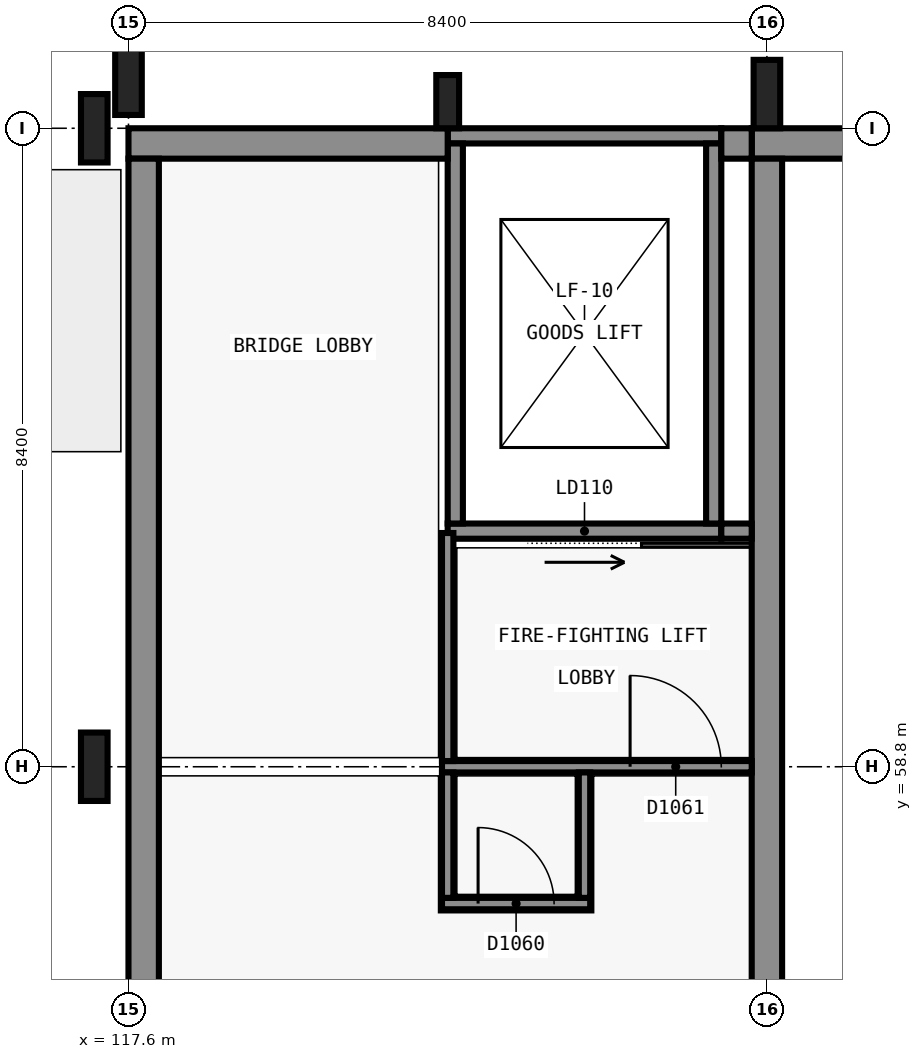
"""IFC4 building model, lengths in metres.
Left out: names, types, materials, properties, quantities, classifications, styles, units other than length and angle.
Written with IfcOpenShell. Run it as: python <this file> out.ifc"""

import sys

from ifc_helpers import new_model, si_unit, direction, frame, frame_2d, origin, origin_2d, place, context, subcontext, project, spatial, rectangle, extrude, element, fill, save


model = new_model("IFC4")
c1 = context("Model", 3, precision=1e-05, world=origin(), true_north=direction((0.0, 1.0)))
c2 = subcontext(c1, "Body", "Model", "MODEL_VIEW")
j1 = project(units=[si_unit("LENGTHUNIT", "METRE"), si_unit("PLANEANGLEUNIT", "RADIAN")], contexts=[c1])
p1 = place(None, origin())
s1 = spatial("IfcSite", under=j1, at=p1, CompositionType="ELEMENT")
p2 = place(p1, origin())
s2 = spatial("IfcBuilding", under=s1, at=p2, CompositionType="ELEMENT")
p3 = place(p2, frame((0.0, 0.0, 5.4)))
s3 = spatial("IfcBuildingStorey", under=s2, at=p3, CompositionType="ELEMENT", Elevation=5.4)
p4 = place(p3, frame((125.4, 61.9, 0.0), z_axis=(0.0, 0.0, 1.0), x_axis=(-1.0, 0.0, 0.0)))
e1 = element("IfcWall", 1, at=p4, inside=s3, PredefinedType="SHEAR", context=c2, shape_type="SweptSolid", body=[
    extrude(rectangle(XDim=3.6, YDim=0.2, at=frame_2d((1.8, 0.0))), origin(), (0.0, 0.0, 1.0), 4.8),
])
p5 = place(p4, frame((1.05, 0.0, 0.0)))
e2 = element("IfcOpeningElement", 2, at=p5, cuts=e1, PredefinedType="OPENING", context=c2, shape_type="SweptSolid", body=[
    extrude(rectangle(XDim=1.5, YDim=2.3, at=frame_2d((0.75, 1.15))), frame((0.0, 0.11, 0.0), z_axis=(0.0, -1.0, 0.0), x_axis=(1.0, 0.0, 0.0)), (0.0, 0.0, 1.0), 0.22),
])
p6 = place(p3, frame((121.8, 67.1, 0.0), z_axis=(0.0, 0.0, 1.0), x_axis=(1.0, 0.0, 0.0)))
e3 = element("IfcWall", 3, at=p6, inside=s3, PredefinedType="SHEAR", context=c2, shape_type="SweptSolid", body=[
    extrude(rectangle(XDim=3.6, YDim=0.2, at=frame_2d((1.8, 0.0))), origin(), (0.0, 0.0, 1.0), 4.8),
])
for number, where, z_axis, x_axis in (
    (4, (121.9, 62.0, 0.0), (0.0, 0.0, 1.0), (0.0, 1.0, 0.0)),
    (5, (125.3, 67.0, 0.0), (0.0, 0.0, 1.0), (0.0, -1.0, 0.0)),
):
    element("IfcWall", number, at=place(p3, frame(where, z_axis=z_axis, x_axis=x_axis)), inside=s3, PredefinedType="SHEAR", context=c2, shape_type="SweptSolid", body=[
        extrude(rectangle(XDim=5.0, YDim=0.2, at=frame_2d((2.5, 0.0))), origin(), (0.0, 0.0, 1.0), 4.8),
    ])
p7 = place(p3, frame((125.8, 67.0, 0.0), z_axis=(0.0, 0.0, 1.0), x_axis=(1.0, 0.0, 0.0)))
e6 = element("IfcWall", 6, at=p7, inside=s3, PredefinedType="SHEAR", context=c2, shape_type="SweptSolid", body=[
    extrude(rectangle(XDim=21.4, YDim=0.4, at=frame_2d((10.7, 0.0))), origin(), (0.0, 0.0, 1.0), 4.8),
])
p8 = place(p3, frame((126.0, 38.0, 0.0), z_axis=(0.0, 0.0, 1.0), x_axis=(0.0, 1.0, 0.0)))
e7 = element("IfcWall", 7, at=p8, inside=s3, PredefinedType="SHEAR", context=c2, shape_type="SweptSolid", body=[
    extrude(rectangle(XDim=28.8, YDim=0.4, at=frame_2d((14.4, 0.0))), origin(), (0.0, 0.0, 1.0), 4.8),
])
p9 = place(p3, frame((117.6, 67.0, 0.0), z_axis=(0.0, 0.0, 1.0), x_axis=(1.0, 0.0, 0.0)))
e8 = element("IfcWall", 8, at=p9, inside=s3, PredefinedType="SHEAR", context=c2, shape_type="SweptSolid", body=[
    extrude(rectangle(XDim=4.2, YDim=0.4, at=frame_2d((2.1, 0.0))), origin(), (0.0, 0.0, 1.0), 4.8),
])
p10 = place(p3, frame((125.6, 66.8, 0.0), z_axis=(0.0, 0.0, 1.0), x_axis=(0.0, 1.0, 0.0)))
e9 = element("IfcWall", 9, at=p10, inside=s3, PredefinedType="SHEAR", context=c2, shape_type="SweptSolid", body=[
    extrude(rectangle(XDim=0.4, YDim=0.4, at=frame_2d((0.2, 0.0))), origin(), (0.0, 0.0, 1.0), 4.8),
])
p11 = place(p3, frame((117.8, 43.2, 0.0), z_axis=(0.0, 0.0, 1.0), x_axis=(0.0, 1.0, 0.0)))
e10 = element("IfcWall", 10, at=p11, inside=s3, PredefinedType="SHEAR", context=c2, shape_type="SweptSolid", body=[
    extrude(rectangle(XDim=23.6, YDim=0.4, at=frame_2d((11.8, 0.0))), origin(), (0.0, 0.0, 1.0), 4.8),
])
p12 = place(p3, frame((125.8, 61.9, 0.0), z_axis=(0.0, 0.0, 1.0), x_axis=(-1.0, 0.0, 0.0)))
e11 = element("IfcWall", 11, at=p12, inside=s3, PredefinedType="SHEAR", context=c2, shape_type="SweptSolid", body=[
    extrude(rectangle(XDim=0.4, YDim=0.2, at=frame_2d((0.2, 0.0))), origin(), (0.0, 0.0, 1.0), 4.8),
])
p13 = place(p3, frame((117.6, 67.825, 0.0), z_axis=(0.0, 0.0, 1.0), x_axis=(1.0, 0.0, 0.0)))
e12 = element("IfcColumn", 12, at=p13, inside=s3, PredefinedType="PILASTER", context=c2, shape_type="SweptSolid", body=[
    extrude(rectangle(XDim=0.35, YDim=0.9, at=origin_2d()), origin(), (0.0, 0.0, 1.0), 4.8),
])
p14 = place(p3, frame((121.8, 67.55, 0.0), z_axis=(0.0, 0.0, 1.0), x_axis=(1.0, 0.0, 0.0)))
e13 = element("IfcColumn", 13, at=p14, inside=s3, PredefinedType="PILASTER", context=c2, shape_type="SweptSolid", body=[
    extrude(rectangle(XDim=0.3, YDim=0.7, at=origin_2d()), origin(), (0.0, 0.0, 1.0), 4.8),
])
for number, where, z_axis, x_axis in (
    (14, (126.0, 67.65, 0.0), (0.0, 0.0, 1.0), (1.0, 0.0, 0.0)),
    (15, (117.15, 58.8, 0.0), (0.0, 0.0, 1.0), (0.0, 1.0, 0.0)),
    (16, (117.15, 67.2, 0.0), (0.0, 0.0, 1.0), (0.0, 1.0, 0.0)),
):
    element("IfcColumn", number, at=place(p3, frame(where, z_axis=z_axis, x_axis=x_axis)), inside=s3, PredefinedType="PILASTER", context=c2, shape_type="SweptSolid", body=[
        extrude(rectangle(XDim=0.35, YDim=0.9, at=origin_2d()), origin(), (0.0, 0.0, 1.0), 4.8),
    ])
p15 = place(p3, frame((121.725, 57.0, 0.0), z_axis=(0.0, 0.0, 1.0), x_axis=(1.0, 0.0, 0.0)))
e17 = element("IfcWall", 17, at=p15, inside=s3, PredefinedType="PARTITIONING", context=c2, shape_type="SweptSolid", body=[
    extrude(rectangle(XDim=1.95, YDim=0.15, at=frame_2d((0.975, 0.0))), origin(), (0.0, 0.0, 1.0), 4.5),
])
p16 = place(p15, frame((0.475, 0.0, 0.0)))
e18 = element("IfcOpeningElement", 18, at=p16, cuts=e17, PredefinedType="OPENING", context=c2, shape_type="SweptSolid", body=[
    extrude(rectangle(XDim=1.0, YDim=2.1, at=frame_2d((0.5, 1.05))), frame((0.0, 0.085, 0.0), z_axis=(0.0, -1.0, 0.0), x_axis=(1.0, 0.0, 0.0)), (0.0, 0.0, 1.0), 0.17),
])
p17 = place(p3, frame((121.725, 58.8, 0.0), z_axis=(0.0, 0.0, 1.0), x_axis=(1.0, 0.0, 0.0)))
e19 = element("IfcWall", 19, at=p17, inside=s3, PredefinedType="SOLIDWALL", context=c2, shape_type="SweptSolid", body=[
    extrude(rectangle(XDim=4.075, YDim=0.15, at=frame_2d((2.038, 0.0))), origin(), (0.0, 0.0, 1.0), 2.7),
])
p18 = place(p17, frame((2.475, 0.0, 0.0)))
e20 = element("IfcOpeningElement", 20, at=p18, cuts=e19, PredefinedType="OPENING", context=c2, shape_type="SweptSolid", body=[
    extrude(rectangle(XDim=1.2, YDim=2.1, at=frame_2d((0.6, 1.05))), frame((0.0, 0.085, 0.0), z_axis=(0.0, -1.0, 0.0), x_axis=(1.0, 0.0, 0.0)), (0.0, 0.0, 1.0), 0.17),
])
for number, where, z_axis, x_axis in (
    (21, (121.8, 57.075, 0.0), (0.0, 0.0, 1.0), (0.0, 1.0, 0.0)),
    (22, (123.6, 57.075, 0.0), (0.0, 0.0, 1.0), (0.0, 1.0, 0.0)),
):
    element("IfcWall", number, at=place(p3, frame(where, z_axis=z_axis, x_axis=x_axis)), inside=s3, PredefinedType="PARTITIONING", context=c2, shape_type="SweptSolid", body=[
        extrude(rectangle(XDim=1.65, YDim=0.15, at=frame_2d((0.825, 0.0))), origin(), (0.0, 0.0, 1.0), 3.8),
    ])
p19 = place(p3, frame((121.8, 58.875, 0.0), z_axis=(0.0, 0.0, 1.0), x_axis=(0.0, 1.0, 0.0)))
e23 = element("IfcWall", 23, at=p19, inside=s3, PredefinedType="SOLIDWALL", context=c2, shape_type="SweptSolid", body=[
    extrude(rectangle(XDim=3.0, YDim=0.15, at=frame_2d((1.5, 0.0))), origin(), (0.0, 0.0, 1.0), 3.8),
])
p20 = place(p5, origin())
e24 = element("IfcDoor", 24, at=p20, inside=s3, OperationType="SLIDING_TO_LEFT", PredefinedType="DOOR", context=c2, shape_type="SweptSolid", body=[
    extrude(rectangle(XDim=1.5, YDim=2.3, at=frame_2d((0.75, 1.15))), frame((0.0, 0.025, 0.0), z_axis=(0.0, -1.0, 0.0), x_axis=(1.0, 0.0, 0.0)), (0.0, 0.0, 1.0), 0.05),
])
fill(e2, e24)
p21 = place(p16, origin())
e25 = element("IfcDoor", 25, at=p21, inside=s3, OperationType="SINGLE_SWING_LEFT", PredefinedType="DOOR", context=c2, shape_type="SweptSolid", body=[
    extrude(rectangle(XDim=1.0, YDim=2.1, at=frame_2d((0.5, 1.05))), frame((0.0, 0.025, 0.0), z_axis=(0.0, -1.0, 0.0), x_axis=(1.0, 0.0, 0.0)), (0.0, 0.0, 1.0), 0.05),
])
fill(e18, e25)
p22 = place(p18, origin())
e26 = element("IfcDoor", 26, at=p22, inside=s3, OperationType="SINGLE_SWING_RIGHT", PredefinedType="DOOR", context=c2, shape_type="SweptSolid", body=[
    extrude(rectangle(XDim=1.2, YDim=2.1, at=frame_2d((0.6, 1.05))), frame((0.0, 0.025, 0.0), z_axis=(0.0, -1.0, 0.0), x_axis=(1.0, 0.0, 0.0)), (0.0, 0.0, 1.0), 0.05),
])
fill(e20, e26)
save(model, sys.argv[1])
